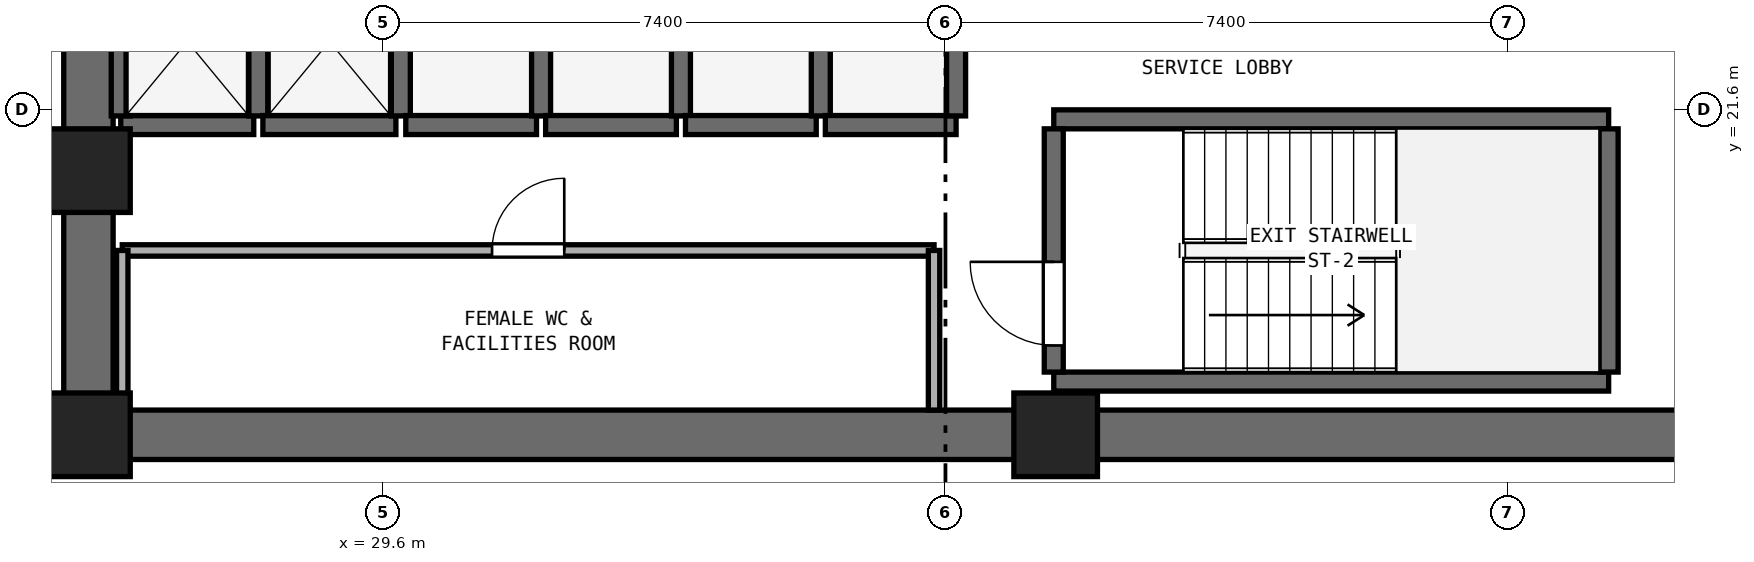
"""IFC4 building model, lengths in metres.
Left out: names, types, materials, properties, quantities, classifications, styles, units other than length and angle.
Written with IfcOpenShell. Run it as: python <this file> out.ifc"""

import sys

from ifc_helpers import new_model, si_unit, direction, frame, frame_2d, origin, origin_2d, place, context, subcontext, project, spatial, rectangle, extrude, element, fill, save


model = new_model("IFC4")
c1 = context("Model", 3, precision=1e-05, world=origin(), true_north=direction((0.0, 1.0)))
c2 = subcontext(c1, "Body", "Model", "MODEL_VIEW")
j1 = project(units=[si_unit("LENGTHUNIT", "METRE"), si_unit("PLANEANGLEUNIT", "RADIAN")], contexts=[c1])
p1 = place(None, origin())
s1 = spatial("IfcSite", under=j1, at=p1, CompositionType="ELEMENT")
p2 = place(p1, origin())
s2 = spatial("IfcBuilding", under=s1, at=p2, CompositionType="ELEMENT")
p3 = place(p2, frame((0.0, 0.0, 104.8)))
s3 = spatial("IfcBuildingStorey", under=s2, at=p3, CompositionType="ELEMENT", Elevation=104.8)
p4 = place(p3, frame((25.4, 17.325, 0.0), z_axis=(0.0, 0.0, 1.0), x_axis=(1.0, 0.0, 0.0)))
e1 = element("IfcWall", 1, at=p4, inside=s3, PredefinedType="SHEAR", context=c2, shape_type="SweptSolid", body=[
    extrude(rectangle(XDim=23.2, YDim=0.65, at=frame_2d((11.6, 0.0))), origin(), (0.0, 0.0, 1.0), 3.525),
])
p5 = place(p3, frame((25.725, 17.65, 0.0), z_axis=(0.0, 0.0, 1.0), x_axis=(0.0, 1.0, 0.0)))
e2 = element("IfcWall", 2, at=p5, inside=s3, PredefinedType="SHEAR", context=c2, shape_type="SweptSolid", body=[
    extrude(rectangle(XDim=15.1, YDim=0.65, at=frame_2d((7.55, 0.0))), origin(), (0.0, 0.0, 1.0), 3.525),
])
p6 = place(p5, frame((6.8, 0.0, 0.0)))
e3 = element("IfcOpeningElement", 3, at=p6, cuts=e2, PredefinedType="OPENING", context=c2, shape_type="SweptSolid", body=[
    extrude(rectangle(XDim=1.5, YDim=2.15, at=frame_2d((0.75, 1.075))), frame((0.0, 0.335, 0.0), z_axis=(0.0, -1.0, 0.0), x_axis=(1.0, 0.0, 0.0)), (0.0, 0.0, 1.0), 0.67),
])
for number, where, z_axis, x_axis in (
    (4, (25.725, 17.325, 0.0), (0.0, 0.0, 1.0), (1.0, 0.0, 0.0)),
    (5, (38.45, 17.325, 0.0), (0.0, 0.0, 1.0), (1.0, 0.0, 0.0)),
    (6, (25.725, 20.8, 0.0), (0.0, 0.0, 1.0), (1.0, 0.0, 0.0)),
):
    element("IfcColumn", number, at=place(p3, frame(where, z_axis=z_axis, x_axis=x_axis)), inside=s3, PredefinedType="PILASTER", context=c2, shape_type="SweptSolid", body=[
        extrude(rectangle(XDim=1.1, YDim=1.1, at=origin_2d()), origin(), (0.0, 0.0, 1.0), 3.8),
    ])
for number, where, z_axis, x_axis in (
    (7, (38.425, 18.025, 0.0), (0.0, 0.0, 1.0), (1.0, 0.0, 0.0)),
    (8, (38.425, 21.475, 0.0), (0.0, 0.0, 1.0), (1.0, 0.0, 0.0)),
):
    element("IfcWall", number, at=place(p3, frame(where, z_axis=z_axis, x_axis=x_axis)), inside=s3, PredefinedType="SHEAR", context=c2, shape_type="SweptSolid", body=[
        extrude(rectangle(XDim=7.3, YDim=0.25, at=frame_2d((3.65, 0.0))), origin(), (0.0, 0.0, 1.0), 3.525),
    ])
p7 = place(p3, frame((38.425, 18.15, 0.0), z_axis=(0.0, 0.0, 1.0), x_axis=(0.0, 1.0, 0.0)))
e9 = element("IfcWall", 9, at=p7, inside=s3, PredefinedType="SHEAR", context=c2, shape_type="SweptSolid", body=[
    extrude(rectangle(XDim=3.2, YDim=0.25, at=frame_2d((1.6, 0.0))), origin(), (0.0, 0.0, 1.0), 3.525),
])
p8 = place(p7, frame((0.35, 0.0, 0.0)))
e10 = element("IfcOpeningElement", 10, at=p8, cuts=e9, PredefinedType="OPENING", context=c2, shape_type="SweptSolid", body=[
    extrude(rectangle(XDim=1.1, YDim=2.15, at=frame_2d((0.55, 1.075))), frame((0.0, 0.135, 0.0), z_axis=(0.0, -1.0, 0.0), x_axis=(1.0, 0.0, 0.0)), (0.0, 0.0, 1.0), 0.27),
])
p9 = place(p3, frame((45.725, 18.15, 0.0), z_axis=(0.0, 0.0, 1.0), x_axis=(0.0, 1.0, 0.0)))
e11 = element("IfcWall", 11, at=p9, inside=s3, PredefinedType="SHEAR", context=c2, shape_type="SweptSolid", body=[
    extrude(rectangle(XDim=3.2, YDim=0.25, at=frame_2d((1.6, 0.0))), origin(), (0.0, 0.0, 1.0), 3.525),
])
p10 = place(p3, frame((26.15, 21.4, 0.0), z_axis=(0.0, 0.0, 1.0), x_axis=(1.0, 0.0, 0.0)))
e12 = element("IfcWall", 12, at=p10, inside=s3, PredefinedType="SHEAR", context=c2, shape_type="SweptSolid", body=[
    extrude(rectangle(XDim=1.75, YDim=0.25, at=frame_2d((0.875, 0.0))), origin(), (0.0, 0.0, 1.0), 3.525),
])
for number, where, z_axis, x_axis in (
    (13, (26.15, 21.52, 0.0), (0.0, 0.0, 1.0), (0.0, 1.0, 0.0)),
    (14, (27.96, 21.52, 0.0), (0.0, 0.0, 1.0), (0.0, 1.0, 0.0)),
):
    element("IfcWall", number, at=place(p3, frame(where, z_axis=z_axis, x_axis=x_axis)), inside=s3, PredefinedType="SHEAR", context=c2, shape_type="SweptSolid", body=[
        extrude(rectangle(XDim=1.96, YDim=0.25, at=frame_2d((0.98, 0.0))), origin(), (0.0, 0.0, 1.0), 3.525),
    ])
p11 = place(p3, frame((28.02, 21.4, 0.0), z_axis=(0.0, 0.0, 1.0), x_axis=(1.0, 0.0, 0.0)))
e15 = element("IfcWall", 15, at=p11, inside=s3, PredefinedType="SHEAR", context=c2, shape_type="SweptSolid", body=[
    extrude(rectangle(XDim=1.75, YDim=0.25, at=frame_2d((0.875, 0.0))), origin(), (0.0, 0.0, 1.0), 3.525),
])
p12 = place(p3, frame((29.835, 21.52, 0.0), z_axis=(0.0, 0.0, 1.0), x_axis=(0.0, 1.0, 0.0)))
e16 = element("IfcWall", 16, at=p12, inside=s3, PredefinedType="SHEAR", context=c2, shape_type="SweptSolid", body=[
    extrude(rectangle(XDim=1.96, YDim=0.25, at=frame_2d((0.98, 0.0))), origin(), (0.0, 0.0, 1.0), 3.525),
])
p13 = place(p3, frame((29.9, 21.4, 0.0), z_axis=(0.0, 0.0, 1.0), x_axis=(1.0, 0.0, 0.0)))
e17 = element("IfcWall", 17, at=p13, inside=s3, PredefinedType="SHEAR", context=c2, shape_type="SweptSolid", body=[
    extrude(rectangle(XDim=1.72, YDim=0.25, at=frame_2d((0.86, 0.0))), origin(), (0.0, 0.0, 1.0), 3.525),
])
p14 = place(p3, frame((31.68, 21.52, 0.0), z_axis=(0.0, 0.0, 1.0), x_axis=(0.0, 1.0, 0.0)))
e18 = element("IfcWall", 18, at=p14, inside=s3, PredefinedType="SHEAR", context=c2, shape_type="SweptSolid", body=[
    extrude(rectangle(XDim=1.96, YDim=0.25, at=frame_2d((0.98, 0.0))), origin(), (0.0, 0.0, 1.0), 3.525),
])
p15 = place(p3, frame((31.74, 21.4, 0.0), z_axis=(0.0, 0.0, 1.0), x_axis=(1.0, 0.0, 0.0)))
e19 = element("IfcWall", 19, at=p15, inside=s3, PredefinedType="SHEAR", context=c2, shape_type="SweptSolid", body=[
    extrude(rectangle(XDim=1.72, YDim=0.25, at=frame_2d((0.86, 0.0))), origin(), (0.0, 0.0, 1.0), 3.525),
])
p16 = place(p3, frame((33.52, 21.52, 0.0), z_axis=(0.0, 0.0, 1.0), x_axis=(0.0, 1.0, 0.0)))
e20 = element("IfcWall", 20, at=p16, inside=s3, PredefinedType="SHEAR", context=c2, shape_type="SweptSolid", body=[
    extrude(rectangle(XDim=1.96, YDim=0.25, at=frame_2d((0.98, 0.0))), origin(), (0.0, 0.0, 1.0), 3.525),
])
p17 = place(p3, frame((33.58, 21.4, 0.0), z_axis=(0.0, 0.0, 1.0), x_axis=(1.0, 0.0, 0.0)))
e21 = element("IfcWall", 21, at=p17, inside=s3, PredefinedType="SHEAR", context=c2, shape_type="SweptSolid", body=[
    extrude(rectangle(XDim=1.72, YDim=0.25, at=frame_2d((0.86, 0.0))), origin(), (0.0, 0.0, 1.0), 3.525),
])
p18 = place(p3, frame((35.36, 21.52, 0.0), z_axis=(0.0, 0.0, 1.0), x_axis=(0.0, 1.0, 0.0)))
e22 = element("IfcWall", 22, at=p18, inside=s3, PredefinedType="SHEAR", context=c2, shape_type="SweptSolid", body=[
    extrude(rectangle(XDim=1.96, YDim=0.25, at=frame_2d((0.98, 0.0))), origin(), (0.0, 0.0, 1.0), 3.525),
])
p19 = place(p3, frame((35.42, 21.4, 0.0), z_axis=(0.0, 0.0, 1.0), x_axis=(1.0, 0.0, 0.0)))
e23 = element("IfcWall", 23, at=p19, inside=s3, PredefinedType="SHEAR", context=c2, shape_type="SweptSolid", body=[
    extrude(rectangle(XDim=1.72, YDim=0.25, at=frame_2d((0.86, 0.0))), origin(), (0.0, 0.0, 1.0), 3.525),
])
p20 = place(p3, frame((37.14, 21.52, 0.0), z_axis=(0.0, 0.0, 1.0), x_axis=(0.0, 1.0, 0.0)))
e24 = element("IfcWall", 24, at=p20, inside=s3, PredefinedType="SHEAR", context=c2, shape_type="SweptSolid", body=[
    extrude(rectangle(XDim=1.96, YDim=0.25, at=frame_2d((0.98, 0.0))), origin(), (0.0, 0.0, 1.0), 3.525),
])
p21 = place(p3, frame((26.17, 19.75, 0.0), z_axis=(0.0, 0.0, 1.0), x_axis=(1.0, 0.0, 0.0)))
e25 = element("IfcWall", 25, at=p21, inside=s3, PredefinedType="PARTITIONING", context=c2, shape_type="SweptSolid", body=[
    extrude(rectangle(XDim=10.68, YDim=0.15, at=frame_2d((5.34, 0.0))), origin(), (0.0, 0.0, 1.0), 3.525),
])
p22 = place(p21, frame((4.865, 0.0, 0.0)))
e26 = element("IfcOpeningElement", 26, at=p22, cuts=e25, PredefinedType="OPENING", context=c2, shape_type="SweptSolid", body=[
    extrude(rectangle(XDim=0.95, YDim=2.1, at=frame_2d((0.475, 1.05))), frame((0.0, 0.085, 0.0), z_axis=(0.0, -1.0, 0.0), x_axis=(1.0, 0.0, 0.0)), (0.0, 0.0, 1.0), 0.17),
])
for number, where, z_axis, x_axis in (
    (27, (26.17, 17.65, 0.0), (0.0, 0.0, 1.0), (0.0, 1.0, 0.0)),
    (28, (36.85, 17.65, 0.0), (0.0, 0.0, 1.0), (0.0, 1.0, 0.0)),
):
    element("IfcWall", number, at=place(p3, frame(where, z_axis=z_axis, x_axis=x_axis)), inside=s3, PredefinedType="PARTITIONING", context=c2, shape_type="SweptSolid", body=[
        extrude(rectangle(XDim=2.1, YDim=0.15, at=frame_2d((1.05, 0.0))), origin(), (0.0, 0.0, 1.0), 3.525),
    ])
p23 = place(p8, origin())
e29 = element("IfcDoor", 29, at=p23, inside=s3, OperationType="SINGLE_SWING_RIGHT", PredefinedType="DOOR", context=c2, shape_type="SweptSolid", body=[
    extrude(rectangle(XDim=1.1, YDim=2.15, at=frame_2d((0.55, 1.075))), frame((0.0, 0.025, 0.0), z_axis=(0.0, -1.0, 0.0), x_axis=(1.0, 0.0, 0.0)), (0.0, 0.0, 1.0), 0.05),
])
fill(e10, e29)
p24 = place(p22, origin())
e30 = element("IfcDoor", 30, at=p24, inside=s3, OperationType="SINGLE_SWING_RIGHT", PredefinedType="DOOR", context=c2, shape_type="SweptSolid", body=[
    extrude(rectangle(XDim=0.95, YDim=2.1, at=frame_2d((0.475, 1.05))), frame((0.0, 0.025, 0.0), z_axis=(0.0, -1.0, 0.0), x_axis=(1.0, 0.0, 0.0)), (0.0, 0.0, 1.0), 0.05),
])
fill(e26, e30)
save(model, sys.argv[1])
